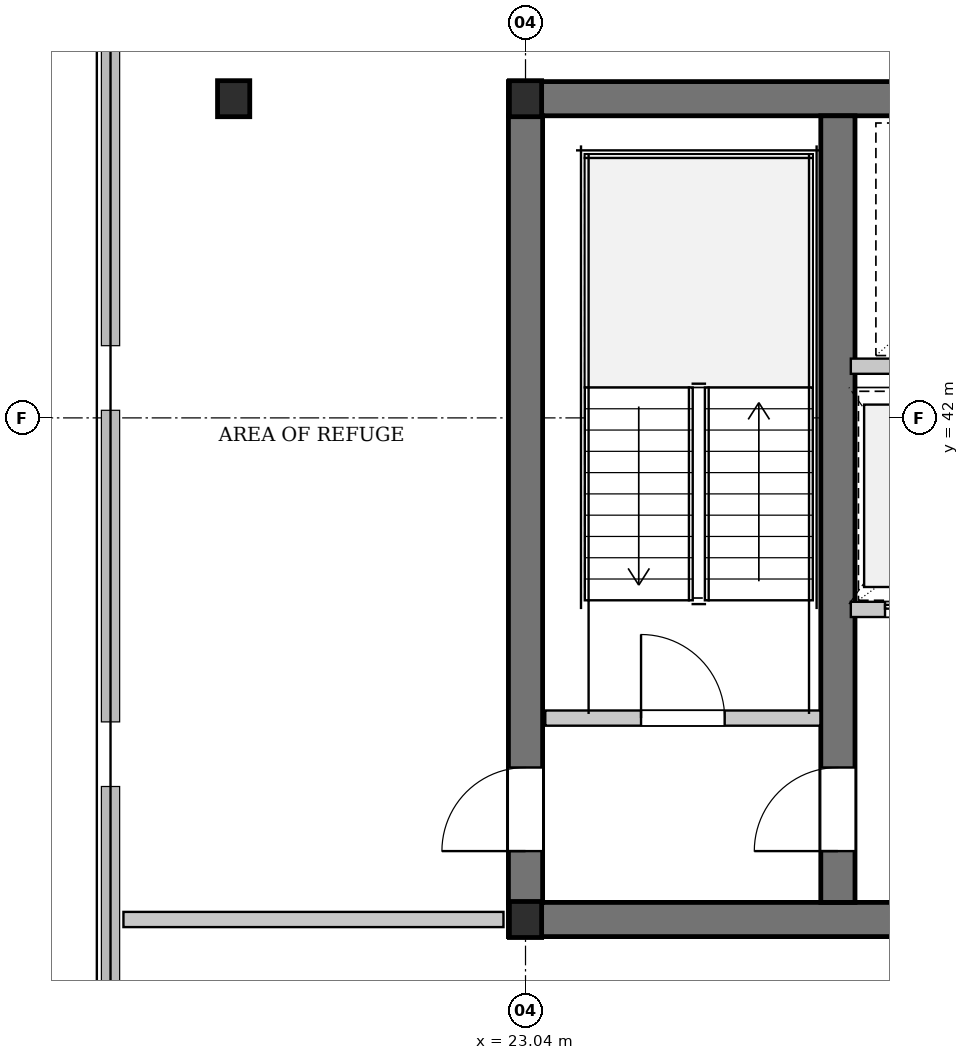
"""IFC4 building model, lengths in metres.
Left out: names, types, materials, properties, quantities, classifications, styles, units other than length and angle.
Written with IfcOpenShell. Run it as: python <this file> out.ifc"""

import sys

from ifc_helpers import new_model, si_unit, direction, frame, frame_2d, origin, origin_2d, place, context, subcontext, project, spatial, rectangle, i_section, extrude, element, fill, save


model = new_model("IFC4")
c1 = context("Model", 3, precision=1e-05, world=origin(), true_north=direction((0.0, 1.0)))
c2 = subcontext(c1, "Body", "Model", "MODEL_VIEW")
j1 = project(units=[si_unit("LENGTHUNIT", "METRE"), si_unit("PLANEANGLEUNIT", "RADIAN")], contexts=[c1])
p1 = place(None, origin())
s1 = spatial("IfcSite", under=j1, at=p1, CompositionType="ELEMENT")
p2 = place(p1, origin())
s2 = spatial("IfcBuilding", under=s1, at=p2, CompositionType="ELEMENT")
p3 = place(p2, frame((0.0, 0.0, 141.2)))
s3 = spatial("IfcBuildingStorey", under=s2, at=p3, CompositionType="ELEMENT", Elevation=141.2)
p4 = place(p3, frame((22.815, 46.2, 0.0), z_axis=(0.0, 0.0, 1.0), x_axis=(1.0, 0.0, 0.0)))
e1 = element("IfcWall", 1, at=p4, inside=s3, PredefinedType="SHEAR", context=c2, shape_type="SweptSolid", body=[
    extrude(rectangle(XDim=31.17, YDim=0.45, at=frame_2d((15.585, 0.0))), origin(), (0.0, 0.0, 1.0), 3.48),
])
p5 = place(p3, frame((22.815, 35.4, 0.0), z_axis=(0.0, 0.0, 1.0), x_axis=(1.0, 0.0, 0.0)))
e2 = element("IfcWall", 2, at=p5, inside=s3, PredefinedType="SHEAR", context=c2, shape_type="SweptSolid", body=[
    extrude(rectangle(XDim=5.385, YDim=0.45, at=frame_2d((2.692, 0.0))), origin(), (0.0, 0.0, 1.0), 3.48),
])
p6 = place(p3, frame((23.04, 35.625, 0.0), z_axis=(0.0, 0.0, 1.0), x_axis=(0.0, 1.0, 0.0)))
e3 = element("IfcWall", 3, at=p6, inside=s3, PredefinedType="SHEAR", context=c2, shape_type="SweptSolid", body=[
    extrude(rectangle(XDim=10.35, YDim=0.45, at=frame_2d((5.175, 0.0))), origin(), (0.0, 0.0, 1.0), 3.48),
])
p7 = place(p6, frame((0.675, 0.0, 0.0)))
e4 = element("IfcOpeningElement", 4, at=p7, cuts=e3, PredefinedType="OPENING", context=c2, shape_type="SweptSolid", body=[
    extrude(rectangle(XDim=1.1, YDim=2.15, at=frame_2d((0.55, 1.075))), frame((0.0, 0.235, 0.0), z_axis=(0.0, -1.0, 0.0), x_axis=(1.0, 0.0, 0.0)), (0.0, 0.0, 1.0), 0.47),
])
p8 = place(p3, frame((27.15, 35.625, 0.0), z_axis=(0.0, 0.0, 1.0), x_axis=(0.0, 1.0, 0.0)))
e5 = element("IfcWall", 5, at=p8, inside=s3, PredefinedType="SHEAR", context=c2, shape_type="SweptSolid", body=[
    extrude(rectangle(XDim=10.35, YDim=0.45, at=frame_2d((5.175, 0.0))), origin(), (0.0, 0.0, 1.0), 3.48),
])
p9 = place(p8, frame((0.675, 0.0, 0.0)))
e6 = element("IfcOpeningElement", 6, at=p9, cuts=e5, PredefinedType="OPENING", context=c2, shape_type="SweptSolid", body=[
    extrude(rectangle(XDim=1.1, YDim=2.15, at=frame_2d((0.55, 1.075))), frame((0.0, 0.235, 0.0), z_axis=(0.0, -1.0, 0.0), x_axis=(1.0, 0.0, 0.0)), (0.0, 0.0, 1.0), 0.47),
])
for number, where, z_axis, x_axis in (
    (7, (23.04, 35.4, 0.0), (0.0, 0.0, 1.0), (1.0, 0.0, 0.0)),
    (8, (23.04, 46.2, 0.0), (0.0, 0.0, 1.0), (1.0, 0.0, 0.0)),
    (9, (19.2, 46.2, 0.0), (0.0, 0.0, 1.0), (1.0, 0.0, 0.0)),
):
    element("IfcColumn", number, at=place(p3, frame(where, z_axis=z_axis, x_axis=x_axis)), inside=s3, PredefinedType="COLUMN", context=c2, shape_type="SweptSolid", body=[
        extrude(i_section(OverallWidth=0.424, OverallDepth=0.474, WebThickness=0.047, FlangeThickness=0.077, FilletRadius=0.015, at=origin_2d()), origin(), (0.0, 0.0, 1.0), 3.9),
    ])
p10 = place(p3, frame((23.3, 38.05, 0.0), z_axis=(0.0, 0.0, 1.0), x_axis=(1.0, 0.0, 0.0)))
e10 = element("IfcWall", 10, at=p10, inside=s3, PredefinedType="PARTITIONING", context=c2, shape_type="SweptSolid", body=[
    extrude(rectangle(XDim=3.62, YDim=0.2, at=frame_2d((1.81, 0.0))), origin(), (0.0, 0.0, 1.0), 3.48),
])
p11 = place(p10, frame((1.26, 0.0, 0.0)))
e11 = element("IfcOpeningElement", 11, at=p11, cuts=e10, PredefinedType="OPENING", context=c2, shape_type="SweptSolid", body=[
    extrude(rectangle(XDim=1.1, YDim=2.15, at=frame_2d((0.55, 1.075))), frame((0.0, 0.11, 0.0), z_axis=(0.0, -1.0, 0.0), x_axis=(1.0, 0.0, 0.0)), (0.0, 0.0, 1.0), 0.22),
])
p12 = place(p3, frame((27.32, 39.48, 0.0), z_axis=(0.0, 0.0, 1.0), x_axis=(1.0, 0.0, 0.0)))
e12 = element("IfcWall", 12, at=p12, inside=s3, PredefinedType="PARTITIONING", context=c2, shape_type="SweptSolid", body=[
    extrude(rectangle(XDim=3.94, YDim=0.2, at=frame_2d((1.97, 0.0))), origin(), (0.0, 0.0, 1.0), 3.48),
])
p13 = place(p12, frame((0.45, 0.0, 0.0)))
e13 = element("IfcOpeningElement", 13, at=p13, cuts=e12, PredefinedType="OPENING", context=c2, shape_type="SweptSolid", body=[
    extrude(rectangle(XDim=1.1, YDim=2.2, at=frame_2d((0.55, 1.1))), frame((0.0, 0.11, 0.0), z_axis=(0.0, -1.0, 0.0), x_axis=(1.0, 0.0, 0.0)), (0.0, 0.0, 1.0), 0.22),
])
p14 = place(p12, frame((2.41, 0.0, 0.0)))
e14 = element("IfcOpeningElement", 14, at=p14, cuts=e12, PredefinedType="OPENING", context=c2, shape_type="SweptSolid", body=[
    extrude(rectangle(XDim=1.1, YDim=2.2, at=frame_2d((0.55, 1.1))), frame((0.0, 0.11, 0.0), z_axis=(0.0, -1.0, 0.0), x_axis=(1.0, 0.0, 0.0)), (0.0, 0.0, 1.0), 0.22),
])
p15 = place(p3, frame((27.32, 42.68, 0.0), z_axis=(0.0, 0.0, 1.0), x_axis=(1.0, 0.0, 0.0)))
e15 = element("IfcWall", 15, at=p15, inside=s3, PredefinedType="PARTITIONING", context=c2, shape_type="SweptSolid", body=[
    extrude(rectangle(XDim=5.33, YDim=0.2, at=frame_2d((2.665, 0.0))), origin(), (0.0, 0.0, 1.0), 3.48),
])
p16 = place(p15, frame((4.18, 0.0, 0.0)))
e16 = element("IfcOpeningElement", 16, at=p16, cuts=e15, PredefinedType="OPENING", context=c2, shape_type="SweptSolid", body=[
    extrude(rectangle(XDim=0.9, YDim=2.15, at=frame_2d((0.45, 1.075))), frame((0.0, 0.11, 0.0), z_axis=(0.0, -1.0, 0.0), x_axis=(1.0, 0.0, 0.0)), (0.0, 0.0, 1.0), 0.22),
])
p17 = place(p3, frame((17.75, 35.4, 0.0), z_axis=(0.0, 0.0, 1.0), x_axis=(1.0, 0.0, 0.0)))
e17 = element("IfcWall", 17, at=p17, inside=s3, PredefinedType="PARTITIONING", context=c2, shape_type="SweptSolid", body=[
    extrude(rectangle(XDim=5.0, YDim=0.2, at=frame_2d((2.5, 0.0))), origin(), (0.0, 0.0, 1.0), 3.48),
])
p18 = place(p11, origin())
e18 = element("IfcDoor", 18, at=p18, inside=s3, OperationType="SINGLE_SWING_LEFT", PredefinedType="DOOR", context=c2, shape_type="SweptSolid", body=[
    extrude(rectangle(XDim=1.1, YDim=2.15, at=frame_2d((0.55, 1.075))), frame((0.0, 0.025, 0.0), z_axis=(0.0, -1.0, 0.0), x_axis=(1.0, 0.0, 0.0)), (0.0, 0.0, 1.0), 0.05),
])
fill(e11, e18)
p19 = place(p13, origin())
e19 = element("IfcDoor", 19, at=p19, inside=s3, OperationType="DOUBLE_DOOR_SLIDING", PredefinedType="DOOR", context=c2, shape_type="SweptSolid", body=[
    extrude(rectangle(XDim=1.1, YDim=2.2, at=frame_2d((0.55, 1.1))), frame((0.0, 0.025, 0.0), z_axis=(0.0, -1.0, 0.0), x_axis=(1.0, 0.0, 0.0)), (0.0, 0.0, 1.0), 0.05),
])
fill(e13, e19)
p20 = place(p9, origin())
e20 = element("IfcDoor", 20, at=p20, inside=s3, OperationType="SINGLE_SWING_LEFT", PredefinedType="DOOR", context=c2, shape_type="SweptSolid", body=[
    extrude(rectangle(XDim=1.1, YDim=2.15, at=frame_2d((0.55, 1.075))), frame((0.0, 0.025, 0.0), z_axis=(0.0, -1.0, 0.0), x_axis=(1.0, 0.0, 0.0)), (0.0, 0.0, 1.0), 0.05),
])
fill(e6, e20)
p21 = place(p7, origin())
e21 = element("IfcDoor", 21, at=p21, inside=s3, OperationType="SINGLE_SWING_LEFT", PredefinedType="DOOR", context=c2, shape_type="SweptSolid", body=[
    extrude(rectangle(XDim=1.1, YDim=2.15, at=frame_2d((0.55, 1.075))), frame((0.0, 0.025, 0.0), z_axis=(0.0, -1.0, 0.0), x_axis=(1.0, 0.0, 0.0)), (0.0, 0.0, 1.0), 0.05),
])
fill(e4, e21)
save(model, sys.argv[1])
